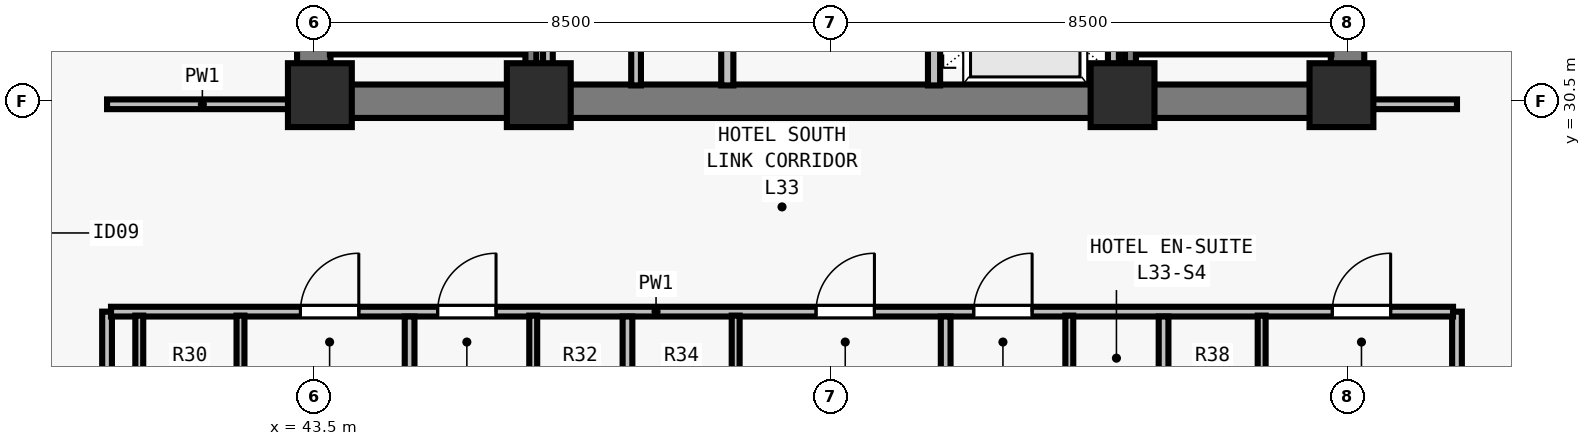
"""IFC4 building model, lengths in metres.
Left out: names, types, materials, properties, quantities, classifications, styles, units other than length and angle.
Written with IfcOpenShell. Run it as: python <this file> out.ifc"""

import sys

from ifc_helpers import new_model, si_unit, direction, frame, frame_2d, origin, origin_2d, place, context, subcontext, project, spatial, rectangle, extrude, element, fill, save


model = new_model("IFC4")
c1 = context("Model", 3, precision=1e-05, world=origin(), true_north=direction((0.0, 1.0)))
c2 = subcontext(c1, "Body", "Model", "MODEL_VIEW")
j1 = project(units=[si_unit("LENGTHUNIT", "METRE"), si_unit("PLANEANGLEUNIT", "RADIAN")], contexts=[c1])
p1 = place(None, origin())
s1 = spatial("IfcSite", under=j1, at=p1, CompositionType="ELEMENT")
p2 = place(p1, origin())
s2 = spatial("IfcBuilding", under=s1, at=p2, CompositionType="ELEMENT")
p3 = place(p2, frame((0.0, 0.0, 123.5)))
s3 = spatial("IfcBuildingStorey", under=s2, at=p3, CompositionType="ELEMENT", Elevation=123.5)
for number, where, z_axis, x_axis in (
    (1, (43.6, 30.6, 0.0), (0.0, 0.0, 1.0), (1.0, 0.0, 0.0)),
    (2, (47.2, 30.6, 0.0), (0.0, 0.0, 1.0), (1.0, 0.0, 0.0)),
    (3, (56.8, 30.6, 0.0), (0.0, 0.0, 1.0), (1.0, 0.0, 0.0)),
    (4, (60.4, 30.6, 0.0), (0.0, 0.0, 1.0), (1.0, 0.0, 0.0)),
):
    element("IfcColumn", number, at=place(p3, frame(where, z_axis=z_axis, x_axis=x_axis)), inside=s3, PredefinedType="COLUMN", context=c2, shape_type="SweptSolid", body=[
        extrude(rectangle(XDim=1.05, YDim=1.05, at=origin_2d()), origin(), (0.0, 0.0, 1.0), 3.5),
    ])
p4 = place(p3, frame((43.225, 30.5, 0.0), z_axis=(0.0, 0.0, 1.0), x_axis=(1.0, 0.0, 0.0)))
e5 = element("IfcWall", 5, at=p4, inside=s3, PredefinedType="SHEAR", context=c2, shape_type="SweptSolid", body=[
    extrude(rectangle(XDim=17.55, YDim=0.55, at=frame_2d((8.775, 0.0))), origin(), (0.0, 0.0, 1.0), 3.28),
])
for number, where, z_axis, x_axis in (
    (6, (43.5, 30.765, 0.0), (0.0, 0.0, 1.0), (0.0, 1.0, 0.0)),
    (7, (60.5, 30.765, 0.0), (0.0, 0.0, 1.0), (0.0, 1.0, 0.0)),
):
    element("IfcWall", number, at=place(p3, frame(where, z_axis=z_axis, x_axis=x_axis)), inside=s3, PredefinedType="SHEAR", context=c2, shape_type="SweptSolid", body=[
        extrude(rectangle(XDim=7.985, YDim=0.55, at=frame_2d((3.993, 0.0))), origin(), (0.0, 0.0, 1.0), 3.28),
    ])
p5 = place(p3, frame((50.3, 30.76, 0.0), z_axis=(0.0, 0.0, 1.0), x_axis=(0.0, 1.0, 0.0)))
e8 = element("IfcWall", 8, at=p5, inside=s3, PredefinedType="SOLIDWALL", context=c2, shape_type="SweptSolid", body=[
    extrude(rectangle(XDim=7.855, YDim=0.2, at=frame_2d((3.927, 0.0))), origin(), (0.0, 0.0, 1.0), 3.28),
])
p6 = place(p5, frame((2.09, 0.0, 0.0)))
e9 = element("IfcOpeningElement", 9, at=p6, cuts=e8, PredefinedType="OPENING", context=c2, shape_type="SweptSolid", body=[
    extrude(rectangle(XDim=0.95, YDim=2.12, at=frame_2d((0.475, 1.06))), frame((0.0, 0.11, 0.0), z_axis=(0.0, -1.0, 0.0), x_axis=(1.0, 0.0, 0.0)), (0.0, 0.0, 1.0), 0.22),
])
p7 = place(p3, frame((53.7, 30.76, 0.0), z_axis=(0.0, 0.0, 1.0), x_axis=(0.0, 1.0, 0.0)))
e10 = element("IfcWall", 10, at=p7, inside=s3, PredefinedType="SOLIDWALL", context=c2, shape_type="SweptSolid", body=[
    extrude(rectangle(XDim=7.855, YDim=0.2, at=frame_2d((3.927, 0.0))), origin(), (0.0, 0.0, 1.0), 3.28),
])
p8 = place(p7, frame((0.79, 0.0, 0.0)))
e11 = element("IfcOpeningElement", 11, at=p8, cuts=e10, PredefinedType="OPENING", context=c2, shape_type="SweptSolid", body=[
    extrude(rectangle(XDim=1.1, YDim=2.2, at=frame_2d((0.55, 1.1))), frame((0.0, 0.11, 0.0), z_axis=(0.0, -1.0, 0.0), x_axis=(1.0, 0.0, 0.0)), (0.0, 0.0, 1.0), 0.22),
])
p9 = place(p7, frame((3.49, 0.0, 0.0)))
e12 = element("IfcOpeningElement", 12, at=p9, cuts=e10, PredefinedType="OPENING", context=c2, shape_type="SweptSolid", body=[
    extrude(rectangle(XDim=1.1, YDim=2.2, at=frame_2d((0.55, 1.1))), frame((0.0, 0.11, 0.0), z_axis=(0.0, -1.0, 0.0), x_axis=(1.0, 0.0, 0.0)), (0.0, 0.0, 1.0), 0.22),
])
p10 = place(p7, frame((6.19, 0.0, 0.0)))
e13 = element("IfcOpeningElement", 13, at=p10, cuts=e10, PredefinedType="OPENING", context=c2, shape_type="SweptSolid", body=[
    extrude(rectangle(XDim=1.1, YDim=2.2, at=frame_2d((0.55, 1.1))), frame((0.0, 0.11, 0.0), z_axis=(0.0, -1.0, 0.0), x_axis=(1.0, 0.0, 0.0)), (0.0, 0.0, 1.0), 0.22),
])
p11 = place(p3, frame((47.35, 30.76, 0.0), z_axis=(0.0, 0.0, 1.0), x_axis=(0.0, 1.0, 0.0)))
e14 = element("IfcWall", 14, at=p11, inside=s3, PredefinedType="PARTITIONING", context=c2, shape_type="SweptSolid", body=[
    extrude(rectangle(XDim=7.855, YDim=0.16, at=frame_2d((3.927, 0.0))), origin(), (0.0, 0.0, 1.0), 3.28),
])
p12 = place(p3, frame((48.8, 30.76, 0.0), z_axis=(0.0, 0.0, 1.0), x_axis=(0.0, 1.0, 0.0)))
e15 = element("IfcWall", 15, at=p12, inside=s3, PredefinedType="PARTITIONING", context=c2, shape_type="SweptSolid", body=[
    extrude(rectangle(XDim=7.855, YDim=0.16, at=frame_2d((3.927, 0.0))), origin(), (0.0, 0.0, 1.0), 3.28),
])
p13 = place(p12, frame((3.49, 0.0, 0.0)))
e16 = element("IfcOpeningElement", 16, at=p13, cuts=e15, PredefinedType="OPENING", context=c2, shape_type="SweptSolid", body=[
    extrude(rectangle(XDim=0.85, YDim=2.12, at=frame_2d((0.425, 1.06))), frame((0.0, 0.09, 0.0), z_axis=(0.0, -1.0, 0.0), x_axis=(1.0, 0.0, 0.0)), (0.0, 0.0, 1.0), 0.18),
])
p14 = place(p3, frame((56.65, 30.76, 0.0), z_axis=(0.0, 0.0, 1.0), x_axis=(0.0, 1.0, 0.0)))
e17 = element("IfcWall", 17, at=p14, inside=s3, PredefinedType="SOLIDWALL", context=c2, shape_type="SweptSolid", body=[
    extrude(rectangle(XDim=7.855, YDim=0.18, at=frame_2d((3.927, 0.0))), origin(), (0.0, 0.0, 1.0), 3.28),
])
p15 = place(p3, frame((40.1, 15.325, 0.0), z_axis=(0.0, 0.0, 1.0), x_axis=(0.0, 1.0, 0.0)))
e18 = element("IfcWall", 18, at=p15, inside=s3, PredefinedType="PARTITIONING", context=c2, shape_type="SweptSolid", body=[
    extrude(rectangle(XDim=11.715, YDim=0.16, at=frame_2d((5.857, 0.0))), origin(), (0.0, 0.0, 1.0), 2.555),
])
p16 = place(p3, frame((40.1, 30.45, 0.0), z_axis=(0.0, 0.0, 1.0), x_axis=(1.0, 0.0, 0.0)))
e19 = element("IfcWall", 19, at=p16, inside=s3, PredefinedType="PARTITIONING", context=c2, shape_type="SweptSolid", body=[
    extrude(rectangle(XDim=3.135, YDim=0.16, at=frame_2d((1.567, 0.0))), origin(), (0.0, 0.0, 1.0), 3.28),
])
p17 = place(p3, frame((62.3, 15.325, 0.0), z_axis=(0.0, 0.0, 1.0), x_axis=(0.0, 1.0, 0.0)))
e20 = element("IfcWall", 20, at=p17, inside=s3, PredefinedType="PARTITIONING", context=c2, shape_type="SweptSolid", body=[
    extrude(rectangle(XDim=11.715, YDim=0.16, at=frame_2d((5.857, 0.0))), origin(), (0.0, 0.0, 1.0), 3.28),
])
p18 = place(p3, frame((60.765, 30.45, 0.0), z_axis=(0.0, 0.0, 1.0), x_axis=(1.0, 0.0, 0.0)))
e21 = element("IfcWall", 21, at=p18, inside=s3, PredefinedType="PARTITIONING", context=c2, shape_type="SweptSolid", body=[
    extrude(rectangle(XDim=1.535, YDim=0.16, at=frame_2d((0.768, 0.0))), origin(), (0.0, 0.0, 1.0), 3.28),
])
p19 = place(p3, frame((40.165, 27.04, 0.0), z_axis=(0.0, 0.0, 1.0), x_axis=(1.0, 0.0, 0.0)))
e22 = element("IfcWall", 22, at=p19, inside=s3, PredefinedType="PARTITIONING", context=c2, shape_type="SweptSolid", body=[
    extrude(rectangle(XDim=22.07, YDim=0.16, at=frame_2d((11.035, 0.0))), origin(), (0.0, 0.0, 1.0), 3.28),
])
p20 = place(p19, frame((3.115, 0.0, 0.0)))
e23 = element("IfcOpeningElement", 23, at=p20, cuts=e22, PredefinedType="OPENING", context=c2, shape_type="SweptSolid", body=[
    extrude(rectangle(XDim=0.96, YDim=2.15, at=frame_2d((0.48, 1.075))), frame((0.0, 0.09, 0.0), z_axis=(0.0, -1.0, 0.0), x_axis=(1.0, 0.0, 0.0)), (0.0, 0.0, 1.0), 0.18),
])
p21 = place(p19, frame((5.372, 0.0, 0.0)))
e24 = element("IfcOpeningElement", 24, at=p21, cuts=e22, PredefinedType="OPENING", context=c2, shape_type="SweptSolid", body=[
    extrude(rectangle(XDim=0.96, YDim=2.15, at=frame_2d((0.48, 1.075))), frame((0.0, 0.09, 0.0), z_axis=(0.0, -1.0, 0.0), x_axis=(1.0, 0.0, 0.0)), (0.0, 0.0, 1.0), 0.18),
])
p22 = place(p19, frame((11.594, 0.0, 0.0)))
e25 = element("IfcOpeningElement", 25, at=p22, cuts=e22, PredefinedType="OPENING", context=c2, shape_type="SweptSolid", body=[
    extrude(rectangle(XDim=0.96, YDim=2.15, at=frame_2d((0.48, 1.075))), frame((0.0, 0.09, 0.0), z_axis=(0.0, -1.0, 0.0), x_axis=(1.0, 0.0, 0.0)), (0.0, 0.0, 1.0), 0.18),
])
p23 = place(p19, frame((14.188, 0.0, 0.0)))
e26 = element("IfcOpeningElement", 26, at=p23, cuts=e22, PredefinedType="OPENING", context=c2, shape_type="SweptSolid", body=[
    extrude(rectangle(XDim=0.96, YDim=2.15, at=frame_2d((0.48, 1.075))), frame((0.0, 0.09, 0.0), z_axis=(0.0, -1.0, 0.0), x_axis=(1.0, 0.0, 0.0)), (0.0, 0.0, 1.0), 0.18),
])
p24 = place(p19, frame((20.084, 0.0, 0.0)))
e27 = element("IfcOpeningElement", 27, at=p24, cuts=e22, PredefinedType="OPENING", context=c2, shape_type="SweptSolid", body=[
    extrude(rectangle(XDim=0.96, YDim=2.15, at=frame_2d((0.48, 1.075))), frame((0.0, 0.09, 0.0), z_axis=(0.0, -1.0, 0.0), x_axis=(1.0, 0.0, 0.0)), (0.0, 0.0, 1.0), 0.18),
])
p25 = place(p3, frame((40.63, 24.66, 0.0), z_axis=(0.0, 0.0, 1.0), x_axis=(0.0, 1.0, 0.0)))
e28 = element("IfcWall", 28, at=p25, inside=s3, PredefinedType="PLUMBINGWALL", context=c2, shape_type="SweptSolid", body=[
    extrude(rectangle(XDim=2.315, YDim=0.13, at=frame_2d((1.158, 0.0))), origin(), (0.0, 0.0, 1.0), 2.555),
])
p26 = place(p3, frame((42.294, 24.66, 0.0), z_axis=(0.0, 0.0, 1.0), x_axis=(0.0, 1.0, 0.0)))
e29 = element("IfcWall", 29, at=p26, inside=s3, PredefinedType="PLUMBINGWALL", context=c2, shape_type="SweptSolid", body=[
    extrude(rectangle(XDim=2.315, YDim=0.13, at=frame_2d((1.158, 0.0))), origin(), (0.0, 0.0, 1.0), 3.28),
])
p27 = place(p3, frame((45.075, 15.325, 0.0), z_axis=(0.0, 0.0, 1.0), x_axis=(0.0, 1.0, 0.0)))
e30 = element("IfcWall", 30, at=p27, inside=s3, PredefinedType="PARTITIONING", context=c2, shape_type="SweptSolid", body=[
    extrude(rectangle(XDim=11.635, YDim=0.16, at=frame_2d((5.817, 0.0))), origin(), (0.0, 0.0, 1.0), 3.28),
])
p28 = place(p3, frame((47.108, 24.66, 0.0), z_axis=(0.0, 0.0, 1.0), x_axis=(0.0, 1.0, 0.0)))
e31 = element("IfcWall", 31, at=p28, inside=s3, PredefinedType="PLUMBINGWALL", context=c2, shape_type="SweptSolid", body=[
    extrude(rectangle(XDim=2.315, YDim=0.13, at=frame_2d((1.158, 0.0))), origin(), (0.0, 0.0, 1.0), 2.555),
])
p29 = place(p3, frame((48.658, 15.325, 0.0), z_axis=(0.0, 0.0, 1.0), x_axis=(0.0, 1.0, 0.0)))
e32 = element("IfcWall", 32, at=p29, inside=s3, PredefinedType="PARTITIONING", context=c2, shape_type="SweptSolid", body=[
    extrude(rectangle(XDim=11.635, YDim=0.16, at=frame_2d((5.817, 0.0))), origin(), (0.0, 0.0, 1.0), 2.896),
])
p30 = place(p3, frame((50.438, 24.66, 0.0), z_axis=(0.0, 0.0, 1.0), x_axis=(0.0, 1.0, 0.0)))
e33 = element("IfcWall", 33, at=p30, inside=s3, PredefinedType="PLUMBINGWALL", context=c2, shape_type="SweptSolid", body=[
    extrude(rectangle(XDim=2.315, YDim=0.13, at=frame_2d((1.158, 0.0))), origin(), (0.0, 0.0, 1.0), 3.28),
])
p31 = place(p3, frame((53.892, 15.325, 0.0), z_axis=(0.0, 0.0, 1.0), x_axis=(0.0, 1.0, 0.0)))
e34 = element("IfcWall", 34, at=p31, inside=s3, PredefinedType="PARTITIONING", context=c2, shape_type="SweptSolid", body=[
    extrude(rectangle(XDim=11.635, YDim=0.16, at=frame_2d((5.817, 0.0))), origin(), (0.0, 0.0, 1.0), 2.896),
])
p32 = place(p3, frame((55.925, 24.66, 0.0), z_axis=(0.0, 0.0, 1.0), x_axis=(0.0, 1.0, 0.0)))
e35 = element("IfcWall", 35, at=p32, inside=s3, PredefinedType="PLUMBINGWALL", context=c2, shape_type="SweptSolid", body=[
    extrude(rectangle(XDim=2.315, YDim=0.13, at=frame_2d((1.158, 0.0))), origin(), (0.0, 0.0, 1.0), 3.28),
])
p33 = place(p3, frame((57.475, 15.325, 0.0), z_axis=(0.0, 0.0, 1.0), x_axis=(0.0, 1.0, 0.0)))
e36 = element("IfcWall", 36, at=p33, inside=s3, PredefinedType="PARTITIONING", context=c2, shape_type="SweptSolid", body=[
    extrude(rectangle(XDim=11.635, YDim=0.16, at=frame_2d((5.817, 0.0))), origin(), (0.0, 0.0, 1.0), 3.28),
])
p34 = place(p3, frame((59.088, 24.66, 0.0), z_axis=(0.0, 0.0, 1.0), x_axis=(0.0, 1.0, 0.0)))
e37 = element("IfcWall", 37, at=p34, inside=s3, PredefinedType="PLUMBINGWALL", context=c2, shape_type="SweptSolid", body=[
    extrude(rectangle(XDim=2.315, YDim=0.13, at=frame_2d((1.158, 0.0))), origin(), (0.0, 0.0, 1.0), 3.28),
])
p35 = place(p3, frame((43.765, 31.36, 0.0), z_axis=(0.0, 0.0, 1.0), x_axis=(1.0, 0.0, 0.0)))
e38 = element("IfcWall", 38, at=p35, inside=s3, PredefinedType="SOLIDWALL", context=c2, shape_type="SweptSolid", body=[
    extrude(rectangle(XDim=3.23, YDim=0.18, at=frame_2d((1.615, 0.0))), origin(), (0.0, 0.0, 1.0), 3.28),
])
p36 = place(p3, frame((47.07, 38.78, 0.0), z_axis=(0.0, 0.0, 1.0), x_axis=(0.0, -1.0, 0.0)))
e39 = element("IfcWall", 39, at=p36, inside=s3, PredefinedType="SOLIDWALL", context=c2, shape_type="SweptSolid", body=[
    extrude(rectangle(XDim=8.017, YDim=0.18, at=frame_2d((4.009, 0.0))), origin(), (0.0, 0.0, 1.0), 3.28),
])
p37 = place(p3, frame((57.005, 31.36, 0.0), z_axis=(0.0, 0.0, 1.0), x_axis=(1.0, 0.0, 0.0)))
e40 = element("IfcWall", 40, at=p37, inside=s3, PredefinedType="SOLIDWALL", context=c2, shape_type="SweptSolid", body=[
    extrude(rectangle(XDim=3.23, YDim=0.18, at=frame_2d((1.615, 0.0))), origin(), (0.0, 0.0, 1.0), 3.28),
])
p38 = place(p3, frame((56.93, 38.78, 0.0), z_axis=(0.0, 0.0, 1.0), x_axis=(0.0, -1.0, 0.0)))
e41 = element("IfcWall", 41, at=p38, inside=s3, PredefinedType="SOLIDWALL", context=c2, shape_type="SweptSolid", body=[
    extrude(rectangle(XDim=8.017, YDim=0.18, at=frame_2d((4.009, 0.0))), origin(), (0.0, 0.0, 1.0), 3.28),
])
p39 = place(p20, origin())
e42 = element("IfcDoor", 42, at=p39, inside=s3, OperationType="SINGLE_SWING_RIGHT", PredefinedType="DOOR", context=c2, shape_type="SweptSolid", body=[
    extrude(rectangle(XDim=0.96, YDim=2.15, at=frame_2d((0.48, 1.075))), frame((0.0, 0.025, 0.0), z_axis=(0.0, -1.0, 0.0), x_axis=(1.0, 0.0, 0.0)), (0.0, 0.0, 1.0), 0.05),
])
fill(e23, e42)
p40 = place(p21, origin())
e43 = element("IfcDoor", 43, at=p40, inside=s3, OperationType="SINGLE_SWING_RIGHT", PredefinedType="DOOR", context=c2, shape_type="SweptSolid", body=[
    extrude(rectangle(XDim=0.96, YDim=2.15, at=frame_2d((0.48, 1.075))), frame((0.0, 0.025, 0.0), z_axis=(0.0, -1.0, 0.0), x_axis=(1.0, 0.0, 0.0)), (0.0, 0.0, 1.0), 0.05),
])
fill(e24, e43)
p41 = place(p22, origin())
e44 = element("IfcDoor", 44, at=p41, inside=s3, OperationType="SINGLE_SWING_RIGHT", PredefinedType="DOOR", context=c2, shape_type="SweptSolid", body=[
    extrude(rectangle(XDim=0.96, YDim=2.15, at=frame_2d((0.48, 1.075))), frame((0.0, 0.025, 0.0), z_axis=(0.0, -1.0, 0.0), x_axis=(1.0, 0.0, 0.0)), (0.0, 0.0, 1.0), 0.05),
])
fill(e25, e44)
p42 = place(p23, origin())
e45 = element("IfcDoor", 45, at=p42, inside=s3, OperationType="SINGLE_SWING_RIGHT", PredefinedType="DOOR", context=c2, shape_type="SweptSolid", body=[
    extrude(rectangle(XDim=0.96, YDim=2.15, at=frame_2d((0.48, 1.075))), frame((0.0, 0.025, 0.0), z_axis=(0.0, -1.0, 0.0), x_axis=(1.0, 0.0, 0.0)), (0.0, 0.0, 1.0), 0.05),
])
fill(e26, e45)
p43 = place(p24, origin())
e46 = element("IfcDoor", 46, at=p43, inside=s3, OperationType="SINGLE_SWING_RIGHT", PredefinedType="DOOR", context=c2, shape_type="SweptSolid", body=[
    extrude(rectangle(XDim=0.96, YDim=2.15, at=frame_2d((0.48, 1.075))), frame((0.0, 0.025, 0.0), z_axis=(0.0, -1.0, 0.0), x_axis=(1.0, 0.0, 0.0)), (0.0, 0.0, 1.0), 0.05),
])
fill(e27, e46)
save(model, sys.argv[1])
